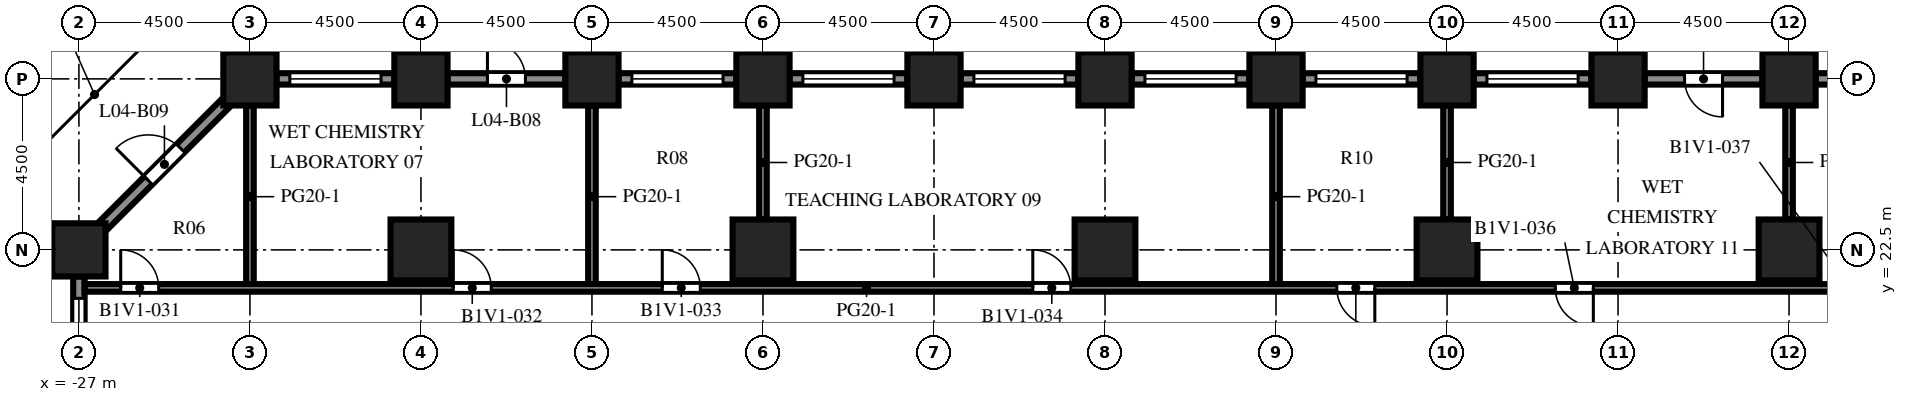
"""IFC4 building model, lengths in metres.
Left out: names, types, materials, properties, quantities, classifications, styles, units other than length and angle.
Written with IfcOpenShell. Run it as: python <this file> out.ifc"""

import sys

from ifc_helpers import new_model, si_unit, direction, frame, frame_2d, origin, origin_2d, place, context, subcontext, project, spatial, rectangle, extrude, element, fill, save


model = new_model("IFC4")
c1 = context("Model", 3, precision=1e-05, world=origin(), true_north=direction((0.0, 1.0)))
c2 = subcontext(c1, "Body", "Model", "MODEL_VIEW")
j1 = project(units=[si_unit("LENGTHUNIT", "METRE"), si_unit("PLANEANGLEUNIT", "RADIAN")], contexts=[c1])
p1 = place(None, origin())
s1 = spatial("IfcSite", under=j1, at=p1, CompositionType="ELEMENT")
p2 = place(p1, origin())
s2 = spatial("IfcBuilding", under=s1, at=p2, CompositionType="ELEMENT")
p3 = place(p2, frame((0.0, 0.0, 19.5)))
s3 = spatial("IfcBuildingStorey", under=s2, at=p3, CompositionType="ELEMENT", Elevation=19.5)
for number, where, z_axis, x_axis in (
    (1, (-27.0, 22.5, 0.0), (0.0, 0.0, 1.0), (1.0, 0.0, 0.0)),
    (2, (-22.5, 27.0, 0.0), (0.0, 0.0, 1.0), (1.0, 0.0, 0.0)),
    (3, (-18.0, 27.0, 0.0), (0.0, 0.0, 1.0), (1.0, 0.0, 0.0)),
    (4, (-13.5, 27.0, 0.0), (0.0, 0.0, 1.0), (1.0, 0.0, 0.0)),
    (5, (-9.0, 27.0, 0.0), (0.0, 0.0, 1.0), (1.0, 0.0, 0.0)),
    (6, (-4.5, 27.0, 0.0), (0.0, 0.0, 1.0), (1.0, 0.0, 0.0)),
    (7, (0.0, 27.0, 0.0), (0.0, 0.0, 1.0), (1.0, 0.0, 0.0)),
    (8, (4.5, 27.0, 0.0), (0.0, 0.0, 1.0), (1.0, 0.0, 0.0)),
    (9, (9.0, 27.0, 0.0), (0.0, 0.0, 1.0), (1.0, 0.0, 0.0)),
    (10, (13.5, 27.0, 0.0), (0.0, 0.0, 1.0), (1.0, 0.0, 0.0)),
    (11, (18.0, 27.0, 0.0), (0.0, 0.0, 1.0), (1.0, 0.0, 0.0)),
):
    element("IfcColumn", number, at=place(p3, frame(where, z_axis=z_axis, x_axis=x_axis)), inside=s3, PredefinedType="COLUMN", context=c2, shape_type="SweptSolid", body=[
        extrude(rectangle(XDim=1.4, YDim=1.4, at=origin_2d()), origin(), (0.0, 0.0, 1.0), 4.1),
    ])
for number, where, z_axis, x_axis in (
    (12, (-18.0, 22.5, 0.0), (0.0, 0.0, 1.0), (1.0, 0.0, 0.0)),
    (13, (-9.0, 22.5, 0.0), (0.0, 0.0, 1.0), (1.0, 0.0, 0.0)),
    (14, (0.0, 22.5, 0.0), (0.0, 0.0, 1.0), (1.0, 0.0, 0.0)),
    (15, (9.0, 22.5, 0.0), (0.0, 0.0, 1.0), (1.0, 0.0, 0.0)),
    (16, (18.0, 22.5, 0.0), (0.0, 0.0, 1.0), (1.0, 0.0, 0.0)),
):
    element("IfcColumn", number, at=place(p3, frame(where, z_axis=z_axis, x_axis=x_axis)), inside=s3, PredefinedType="COLUMN", context=c2, shape_type="SweptSolid", body=[
        extrude(rectangle(XDim=1.6, YDim=1.6, at=origin_2d()), origin(), (0.0, 0.0, 1.0), 4.1),
    ])
p4 = place(p3, frame((18.7, 27.0, 0.0), z_axis=(0.0, 0.0, 1.0), x_axis=(1.0, 0.0, 0.0)))
e17 = element("IfcWall", 17, at=p4, inside=s3, PredefinedType="SOLIDWALL", context=c2, shape_type="SweptSolid", body=[
    extrude(rectangle(XDim=3.1, YDim=0.3, at=frame_2d((1.55, 0.0))), origin(), (0.0, 0.0, 1.0), 2.75),
])
p5 = place(p4, frame((0.35, 0.0, 0.8)))
e18 = element("IfcOpeningElement", 18, at=p5, cuts=e17, PredefinedType="OPENING", context=c2, shape_type="SweptSolid", body=[
    extrude(rectangle(XDim=2.4, YDim=1.7, at=frame_2d((1.2, 0.85))), frame((0.0, 0.16, 0.0), z_axis=(0.0, -1.0, 0.0), x_axis=(1.0, 0.0, 0.0)), (0.0, 0.0, 1.0), 0.32),
])
p6 = place(p3, frame((14.2, 27.0, 0.0), z_axis=(0.0, 0.0, 1.0), x_axis=(1.0, 0.0, 0.0)))
e19 = element("IfcWall", 19, at=p6, inside=s3, PredefinedType="SOLIDWALL", context=c2, shape_type="SweptSolid", body=[
    extrude(rectangle(XDim=3.1, YDim=0.3, at=frame_2d((1.55, 0.0))), origin(), (0.0, 0.0, 1.0), 2.75),
])
p7 = place(p6, frame((1.05, 0.0, 0.0)))
e20 = element("IfcOpeningElement", 20, at=p7, cuts=e19, PredefinedType="OPENING", context=c2, shape_type="SweptSolid", body=[
    extrude(rectangle(XDim=1.0, YDim=2.2, at=frame_2d((0.5, 1.1))), frame((0.0, 0.16, 0.0), z_axis=(0.0, -1.0, 0.0), x_axis=(1.0, 0.0, 0.0)), (0.0, 0.0, 1.0), 0.32),
])
p8 = place(p3, frame((9.7, 27.0, 0.0), z_axis=(0.0, 0.0, 1.0), x_axis=(1.0, 0.0, 0.0)))
e21 = element("IfcWall", 21, at=p8, inside=s3, PredefinedType="SOLIDWALL", context=c2, shape_type="SweptSolid", body=[
    extrude(rectangle(XDim=3.1, YDim=0.3, at=frame_2d((1.55, 0.0))), origin(), (0.0, 0.0, 1.0), 2.75),
])
p9 = place(p8, frame((0.35, 0.0, 0.8)))
e22 = element("IfcOpeningElement", 22, at=p9, cuts=e21, PredefinedType="OPENING", context=c2, shape_type="SweptSolid", body=[
    extrude(rectangle(XDim=2.4, YDim=1.7, at=frame_2d((1.2, 0.85))), frame((0.0, 0.16, 0.0), z_axis=(0.0, -1.0, 0.0), x_axis=(1.0, 0.0, 0.0)), (0.0, 0.0, 1.0), 0.32),
])
p10 = place(p3, frame((5.2, 27.0, 0.0), z_axis=(0.0, 0.0, 1.0), x_axis=(1.0, 0.0, 0.0)))
e23 = element("IfcWall", 23, at=p10, inside=s3, PredefinedType="SOLIDWALL", context=c2, shape_type="SweptSolid", body=[
    extrude(rectangle(XDim=3.1, YDim=0.3, at=frame_2d((1.55, 0.0))), origin(), (0.0, 0.0, 1.0), 2.75),
])
p11 = place(p10, frame((0.35, 0.0, 0.8)))
e24 = element("IfcOpeningElement", 24, at=p11, cuts=e23, PredefinedType="OPENING", context=c2, shape_type="SweptSolid", body=[
    extrude(rectangle(XDim=2.4, YDim=1.7, at=frame_2d((1.2, 0.85))), frame((0.0, 0.16, 0.0), z_axis=(0.0, -1.0, 0.0), x_axis=(1.0, 0.0, 0.0)), (0.0, 0.0, 1.0), 0.32),
])
p12 = place(p3, frame((0.7, 27.0, 0.0), z_axis=(0.0, 0.0, 1.0), x_axis=(1.0, 0.0, 0.0)))
e25 = element("IfcWall", 25, at=p12, inside=s3, PredefinedType="SOLIDWALL", context=c2, shape_type="SweptSolid", body=[
    extrude(rectangle(XDim=3.1, YDim=0.3, at=frame_2d((1.55, 0.0))), origin(), (0.0, 0.0, 1.0), 2.75),
])
p13 = place(p12, frame((0.35, 0.0, 0.8)))
e26 = element("IfcOpeningElement", 26, at=p13, cuts=e25, PredefinedType="OPENING", context=c2, shape_type="SweptSolid", body=[
    extrude(rectangle(XDim=2.4, YDim=1.7, at=frame_2d((1.2, 0.85))), frame((0.0, 0.16, 0.0), z_axis=(0.0, -1.0, 0.0), x_axis=(1.0, 0.0, 0.0)), (0.0, 0.0, 1.0), 0.32),
])
p14 = place(p3, frame((-3.8, 27.0, 0.0), z_axis=(0.0, 0.0, 1.0), x_axis=(1.0, 0.0, 0.0)))
e27 = element("IfcWall", 27, at=p14, inside=s3, PredefinedType="SOLIDWALL", context=c2, shape_type="SweptSolid", body=[
    extrude(rectangle(XDim=3.1, YDim=0.3, at=frame_2d((1.55, 0.0))), origin(), (0.0, 0.0, 1.0), 2.75),
])
p15 = place(p14, frame((0.35, 0.0, 0.8)))
e28 = element("IfcOpeningElement", 28, at=p15, cuts=e27, PredefinedType="OPENING", context=c2, shape_type="SweptSolid", body=[
    extrude(rectangle(XDim=2.4, YDim=1.7, at=frame_2d((1.2, 0.85))), frame((0.0, 0.16, 0.0), z_axis=(0.0, -1.0, 0.0), x_axis=(1.0, 0.0, 0.0)), (0.0, 0.0, 1.0), 0.32),
])
p16 = place(p3, frame((-8.3, 27.0, 0.0), z_axis=(0.0, 0.0, 1.0), x_axis=(1.0, 0.0, 0.0)))
e29 = element("IfcWall", 29, at=p16, inside=s3, PredefinedType="SOLIDWALL", context=c2, shape_type="SweptSolid", body=[
    extrude(rectangle(XDim=3.1, YDim=0.3, at=frame_2d((1.55, 0.0))), origin(), (0.0, 0.0, 1.0), 2.75),
])
p17 = place(p16, frame((0.35, 0.0, 0.8)))
e30 = element("IfcOpeningElement", 30, at=p17, cuts=e29, PredefinedType="OPENING", context=c2, shape_type="SweptSolid", body=[
    extrude(rectangle(XDim=2.4, YDim=1.7, at=frame_2d((1.2, 0.85))), frame((0.0, 0.16, 0.0), z_axis=(0.0, -1.0, 0.0), x_axis=(1.0, 0.0, 0.0)), (0.0, 0.0, 1.0), 0.32),
])
p18 = place(p3, frame((-12.8, 27.0, 0.0), z_axis=(0.0, 0.0, 1.0), x_axis=(1.0, 0.0, 0.0)))
e31 = element("IfcWall", 31, at=p18, inside=s3, PredefinedType="SOLIDWALL", context=c2, shape_type="SweptSolid", body=[
    extrude(rectangle(XDim=3.1, YDim=0.3, at=frame_2d((1.55, 0.0))), origin(), (0.0, 0.0, 1.0), 2.75),
])
p19 = place(p18, frame((0.35, 0.0, 0.8)))
e32 = element("IfcOpeningElement", 32, at=p19, cuts=e31, PredefinedType="OPENING", context=c2, shape_type="SweptSolid", body=[
    extrude(rectangle(XDim=2.4, YDim=1.7, at=frame_2d((1.2, 0.85))), frame((0.0, 0.16, 0.0), z_axis=(0.0, -1.0, 0.0), x_axis=(1.0, 0.0, 0.0)), (0.0, 0.0, 1.0), 0.32),
])
p20 = place(p3, frame((-17.3, 27.0, 0.0), z_axis=(0.0, 0.0, 1.0), x_axis=(1.0, 0.0, 0.0)))
e33 = element("IfcWall", 33, at=p20, inside=s3, PredefinedType="SOLIDWALL", context=c2, shape_type="SweptSolid", body=[
    extrude(rectangle(XDim=3.1, YDim=0.3, at=frame_2d((1.55, 0.0))), origin(), (0.0, 0.0, 1.0), 2.75),
])
p21 = place(p20, frame((1.05, 0.0, 0.0)))
e34 = element("IfcOpeningElement", 34, at=p21, cuts=e33, PredefinedType="OPENING", context=c2, shape_type="SweptSolid", body=[
    extrude(rectangle(XDim=1.0, YDim=2.2, at=frame_2d((0.5, 1.1))), frame((0.0, 0.16, 0.0), z_axis=(0.0, -1.0, 0.0), x_axis=(1.0, 0.0, 0.0)), (0.0, 0.0, 1.0), 0.32),
])
p22 = place(p3, frame((-21.8, 27.0, 0.0), z_axis=(0.0, 0.0, 1.0), x_axis=(1.0, 0.0, 0.0)))
e35 = element("IfcWall", 35, at=p22, inside=s3, PredefinedType="SOLIDWALL", context=c2, shape_type="SweptSolid", body=[
    extrude(rectangle(XDim=3.1, YDim=0.3, at=frame_2d((1.55, 0.0))), origin(), (0.0, 0.0, 1.0), 2.75),
])
p23 = place(p22, frame((0.35, 0.0, 0.8)))
e36 = element("IfcOpeningElement", 36, at=p23, cuts=e35, PredefinedType="OPENING", context=c2, shape_type="SweptSolid", body=[
    extrude(rectangle(XDim=2.4, YDim=1.7, at=frame_2d((1.2, 0.85))), frame((0.0, 0.16, 0.0), z_axis=(0.0, -1.0, 0.0), x_axis=(1.0, 0.0, 0.0)), (0.0, 0.0, 1.0), 0.32),
])
p24 = place(p3, frame((-26.406, 23.094, 0.0), z_axis=(0.0, 0.0, 1.0), x_axis=(0.707106781187, 0.707106781187, 0.0)))
e37 = element("IfcWall", 37, at=p24, inside=s3, PredefinedType="SOLIDWALL", context=c2, shape_type="SweptSolid", body=[
    extrude(rectangle(XDim=4.684, YDim=0.3, at=frame_2d((2.342, 0.0))), origin(), (0.0, 0.0, 1.0), 2.75),
])
p25 = place(p24, frame((1.742, 0.0, 0.0)))
e38 = element("IfcOpeningElement", 38, at=p25, cuts=e37, PredefinedType="OPENING", context=c2, shape_type="SweptSolid", body=[
    extrude(rectangle(XDim=1.2, YDim=2.2, at=frame_2d((0.6, 1.1))), frame((0.0, 0.16, 0.0), z_axis=(0.0, -1.0, 0.0), x_axis=(1.0, 0.0, 0.0)), (0.0, 0.0, 1.0), 0.32),
])
p26 = place(p3, frame((-27.0, 18.7, 0.0), z_axis=(0.0, 0.0, 1.0), x_axis=(0.0, 1.0, 0.0)))
e39 = element("IfcWall", 39, at=p26, inside=s3, PredefinedType="SOLIDWALL", context=c2, shape_type="SweptSolid", body=[
    extrude(rectangle(XDim=3.1, YDim=0.3, at=frame_2d((1.55, 0.0))), origin(), (0.0, 0.0, 1.0), 2.75),
])
p27 = place(p26, frame((0.125, 0.0, 0.8)))
e40 = element("IfcOpeningElement", 40, at=p27, cuts=e39, PredefinedType="OPENING", context=c2, shape_type="SweptSolid", body=[
    extrude(rectangle(XDim=2.4, YDim=1.7, at=frame_2d((1.2, 0.85))), frame((0.0, 0.16, 0.0), z_axis=(0.0, -1.0, 0.0), x_axis=(1.0, 0.0, 0.0)), (0.0, 0.0, 1.0), 0.32),
])
for number, where, z_axis, x_axis in (
    (41, (-22.5, 21.5, 0.0), (0.0, 0.0, 1.0), (0.0, 1.0, 0.0)),
    (42, (-13.5, 21.5, 0.0), (0.0, 0.0, 1.0), (0.0, 1.0, 0.0)),
):
    element("IfcWall", number, at=place(p3, frame(where, z_axis=z_axis, x_axis=x_axis)), inside=s3, PredefinedType="PARTITIONING", context=c2, shape_type="SweptSolid", body=[
        extrude(rectangle(XDim=4.8, YDim=0.2, at=frame_2d((2.4, 0.0))), origin(), (0.0, 0.0, 1.0), 3.65),
    ])
p28 = place(p3, frame((-9.0, 23.3, 0.0), z_axis=(0.0, 0.0, 1.0), x_axis=(0.0, 1.0, 0.0)))
e43 = element("IfcWall", 43, at=p28, inside=s3, PredefinedType="PARTITIONING", context=c2, shape_type="SweptSolid", body=[
    extrude(rectangle(XDim=3.0, YDim=0.2, at=frame_2d((1.5, 0.0))), origin(), (0.0, 0.0, 1.0), 3.65),
])
p29 = place(p3, frame((4.5, 21.5, 0.0), z_axis=(0.0, 0.0, 1.0), x_axis=(0.0, 1.0, 0.0)))
e44 = element("IfcWall", 44, at=p29, inside=s3, PredefinedType="PARTITIONING", context=c2, shape_type="SweptSolid", body=[
    extrude(rectangle(XDim=4.8, YDim=0.2, at=frame_2d((2.4, 0.0))), origin(), (0.0, 0.0, 1.0), 3.65),
])
for number, where, z_axis, x_axis in (
    (45, (9.0, 23.3, 0.0), (0.0, 0.0, 1.0), (0.0, 1.0, 0.0)),
    (46, (18.0, 23.3, 0.0), (0.0, 0.0, 1.0), (0.0, 1.0, 0.0)),
):
    element("IfcWall", number, at=place(p3, frame(where, z_axis=z_axis, x_axis=x_axis)), inside=s3, PredefinedType="PARTITIONING", context=c2, shape_type="SweptSolid", body=[
        extrude(rectangle(XDim=3.0, YDim=0.2, at=frame_2d((1.5, 0.0))), origin(), (0.0, 0.0, 1.0), 3.65),
    ])
p30 = place(p3, frame((-26.85, 21.5, 0.0), z_axis=(0.0, 0.0, 1.0), x_axis=(1.0, 0.0, 0.0)))
e47 = element("IfcWall", 47, at=p30, inside=s3, PredefinedType="PARTITIONING", context=c2, shape_type="SweptSolid", body=[
    extrude(rectangle(XDim=53.7, YDim=0.2, at=frame_2d((26.85, 0.0))), origin(), (0.0, 0.0, 1.0), 3.65),
])
p31 = place(p30, frame((0.95, 0.0, 0.0)))
e48 = element("IfcOpeningElement", 48, at=p31, cuts=e47, PredefinedType="OPENING", context=c2, shape_type="SweptSolid", body=[
    extrude(rectangle(XDim=1.0, YDim=2.1, at=frame_2d((0.5, 1.05))), frame((0.0, 0.11, 0.0), z_axis=(0.0, -1.0, 0.0), x_axis=(1.0, 0.0, 0.0)), (0.0, 0.0, 1.0), 0.22),
])
p32 = place(p30, frame((9.7, 0.0, 0.0)))
e49 = element("IfcOpeningElement", 49, at=p32, cuts=e47, PredefinedType="OPENING", context=c2, shape_type="SweptSolid", body=[
    extrude(rectangle(XDim=1.0, YDim=2.1, at=frame_2d((0.5, 1.05))), frame((0.0, 0.11, 0.0), z_axis=(0.0, -1.0, 0.0), x_axis=(1.0, 0.0, 0.0)), (0.0, 0.0, 1.0), 0.22),
])
p33 = place(p30, frame((15.2, 0.0, 0.0)))
e50 = element("IfcOpeningElement", 50, at=p33, cuts=e47, PredefinedType="OPENING", context=c2, shape_type="SweptSolid", body=[
    extrude(rectangle(XDim=1.0, YDim=2.1, at=frame_2d((0.5, 1.05))), frame((0.0, 0.11, 0.0), z_axis=(0.0, -1.0, 0.0), x_axis=(1.0, 0.0, 0.0)), (0.0, 0.0, 1.0), 0.22),
])
p34 = place(p30, frame((24.95, 0.0, 0.0)))
e51 = element("IfcOpeningElement", 51, at=p34, cuts=e47, PredefinedType="OPENING", context=c2, shape_type="SweptSolid", body=[
    extrude(rectangle(XDim=1.0, YDim=2.1, at=frame_2d((0.5, 1.05))), frame((0.0, 0.11, 0.0), z_axis=(0.0, -1.0, 0.0), x_axis=(1.0, 0.0, 0.0)), (0.0, 0.0, 1.0), 0.22),
])
p35 = place(p30, frame((32.95, 0.0, 0.0)))
e52 = element("IfcOpeningElement", 52, at=p35, cuts=e47, PredefinedType="OPENING", context=c2, shape_type="SweptSolid", body=[
    extrude(rectangle(XDim=1.0, YDim=2.1, at=frame_2d((0.5, 1.05))), frame((0.0, 0.11, 0.0), z_axis=(0.0, -1.0, 0.0), x_axis=(1.0, 0.0, 0.0)), (0.0, 0.0, 1.0), 0.22),
])
p36 = place(p30, frame((38.7, 0.0, 0.0)))
e53 = element("IfcOpeningElement", 53, at=p36, cuts=e47, PredefinedType="OPENING", context=c2, shape_type="SweptSolid", body=[
    extrude(rectangle(XDim=1.0, YDim=2.1, at=frame_2d((0.5, 1.05))), frame((0.0, 0.11, 0.0), z_axis=(0.0, -1.0, 0.0), x_axis=(1.0, 0.0, 0.0)), (0.0, 0.0, 1.0), 0.22),
])
p37 = place(p30, frame((45.95, 0.0, 0.0)))
e54 = element("IfcOpeningElement", 54, at=p37, cuts=e47, PredefinedType="OPENING", context=c2, shape_type="SweptSolid", body=[
    extrude(rectangle(XDim=1.0, YDim=2.1, at=frame_2d((0.5, 1.05))), frame((0.0, 0.11, 0.0), z_axis=(0.0, -1.0, 0.0), x_axis=(1.0, 0.0, 0.0)), (0.0, 0.0, 1.0), 0.22),
])
p38 = place(p30, frame((50.7, 0.0, 0.0)))
e55 = element("IfcOpeningElement", 55, at=p38, cuts=e47, PredefinedType="OPENING", context=c2, shape_type="SweptSolid", body=[
    extrude(rectangle(XDim=1.0, YDim=2.1, at=frame_2d((0.5, 1.05))), frame((0.0, 0.11, 0.0), z_axis=(0.0, -1.0, 0.0), x_axis=(1.0, 0.0, 0.0)), (0.0, 0.0, 1.0), 0.22),
])
p39 = place(p7, origin())
e56 = element("IfcDoor", 56, at=p39, inside=s3, OperationType="SINGLE_SWING_RIGHT", PredefinedType="DOOR", context=c2, shape_type="SweptSolid", body=[
    extrude(rectangle(XDim=1.0, YDim=2.2, at=frame_2d((0.5, 1.1))), frame((0.0, 0.025, 0.0), z_axis=(0.0, -1.0, 0.0), x_axis=(1.0, 0.0, 0.0)), (0.0, 0.0, 1.0), 0.05),
])
fill(e20, e56)
p40 = place(p9, origin())
e57 = element("IfcWindow", 57, at=p40, inside=s3, PartitioningType="SINGLE_PANEL", PredefinedType="WINDOW", context=c2, shape_type="SweptSolid", body=[
    extrude(rectangle(XDim=2.4, YDim=1.7, at=frame_2d((1.2, 0.85))), frame((0.0, 0.03, 0.0), z_axis=(0.0, -1.0, 0.0), x_axis=(1.0, 0.0, 0.0)), (0.0, 0.0, 1.0), 0.06),
])
fill(e22, e57)
p41 = place(p11, origin())
e58 = element("IfcWindow", 58, at=p41, inside=s3, PartitioningType="SINGLE_PANEL", PredefinedType="WINDOW", context=c2, shape_type="SweptSolid", body=[
    extrude(rectangle(XDim=2.4, YDim=1.7, at=frame_2d((1.2, 0.85))), frame((0.0, 0.03, 0.0), z_axis=(0.0, -1.0, 0.0), x_axis=(1.0, 0.0, 0.0)), (0.0, 0.0, 1.0), 0.06),
])
fill(e24, e58)
p42 = place(p13, origin())
e59 = element("IfcWindow", 59, at=p42, inside=s3, PartitioningType="SINGLE_PANEL", PredefinedType="WINDOW", context=c2, shape_type="SweptSolid", body=[
    extrude(rectangle(XDim=2.4, YDim=1.7, at=frame_2d((1.2, 0.85))), frame((0.0, 0.03, 0.0), z_axis=(0.0, -1.0, 0.0), x_axis=(1.0, 0.0, 0.0)), (0.0, 0.0, 1.0), 0.06),
])
fill(e26, e59)
p43 = place(p15, origin())
e60 = element("IfcWindow", 60, at=p43, inside=s3, PartitioningType="SINGLE_PANEL", PredefinedType="WINDOW", context=c2, shape_type="SweptSolid", body=[
    extrude(rectangle(XDim=2.4, YDim=1.7, at=frame_2d((1.2, 0.85))), frame((0.0, 0.03, 0.0), z_axis=(0.0, -1.0, 0.0), x_axis=(1.0, 0.0, 0.0)), (0.0, 0.0, 1.0), 0.06),
])
fill(e28, e60)
p44 = place(p17, origin())
e61 = element("IfcWindow", 61, at=p44, inside=s3, PartitioningType="SINGLE_PANEL", PredefinedType="WINDOW", context=c2, shape_type="SweptSolid", body=[
    extrude(rectangle(XDim=2.4, YDim=1.7, at=frame_2d((1.2, 0.85))), frame((0.0, 0.03, 0.0), z_axis=(0.0, -1.0, 0.0), x_axis=(1.0, 0.0, 0.0)), (0.0, 0.0, 1.0), 0.06),
])
fill(e30, e61)
p45 = place(p19, origin())
e62 = element("IfcWindow", 62, at=p45, inside=s3, PartitioningType="SINGLE_PANEL", PredefinedType="WINDOW", context=c2, shape_type="SweptSolid", body=[
    extrude(rectangle(XDim=2.4, YDim=1.7, at=frame_2d((1.2, 0.85))), frame((0.0, 0.03, 0.0), z_axis=(0.0, -1.0, 0.0), x_axis=(1.0, 0.0, 0.0)), (0.0, 0.0, 1.0), 0.06),
])
fill(e32, e62)
p46 = place(p21, origin())
e63 = element("IfcDoor", 63, at=p46, inside=s3, OperationType="SINGLE_SWING_LEFT", PredefinedType="DOOR", context=c2, shape_type="SweptSolid", body=[
    extrude(rectangle(XDim=1.0, YDim=2.2, at=frame_2d((0.5, 1.1))), frame((0.0, 0.025, 0.0), z_axis=(0.0, -1.0, 0.0), x_axis=(1.0, 0.0, 0.0)), (0.0, 0.0, 1.0), 0.05),
])
fill(e34, e63)
p47 = place(p23, origin())
e64 = element("IfcWindow", 64, at=p47, inside=s3, PartitioningType="SINGLE_PANEL", PredefinedType="WINDOW", context=c2, shape_type="SweptSolid", body=[
    extrude(rectangle(XDim=2.4, YDim=1.7, at=frame_2d((1.2, 0.85))), frame((0.0, 0.03, 0.0), z_axis=(0.0, -1.0, 0.0), x_axis=(1.0, 0.0, 0.0)), (0.0, 0.0, 1.0), 0.06),
])
fill(e36, e64)
p48 = place(p25, origin())
e65 = element("IfcDoor", 65, at=p48, inside=s3, OperationType="SINGLE_SWING_LEFT", PredefinedType="DOOR", context=c2, shape_type="SweptSolid", body=[
    extrude(rectangle(XDim=1.2, YDim=2.2, at=frame_2d((0.6, 1.1))), frame((0.0, 0.025, 0.0), z_axis=(0.0, -1.0, 0.0), x_axis=(1.0, 0.0, 0.0)), (0.0, 0.0, 1.0), 0.05),
])
fill(e38, e65)
p49 = place(p27, origin())
e66 = element("IfcWindow", 66, at=p49, inside=s3, PartitioningType="SINGLE_PANEL", PredefinedType="WINDOW", context=c2, shape_type="SweptSolid", body=[
    extrude(rectangle(XDim=2.4, YDim=1.7, at=frame_2d((1.2, 0.85))), frame((0.0, 0.03, 0.0), z_axis=(0.0, -1.0, 0.0), x_axis=(1.0, 0.0, 0.0)), (0.0, 0.0, 1.0), 0.06),
])
fill(e40, e66)
p50 = place(p31, origin())
e67 = element("IfcDoor", 67, at=p50, inside=s3, OperationType="SINGLE_SWING_LEFT", PredefinedType="DOOR", context=c2, shape_type="SweptSolid", body=[
    extrude(rectangle(XDim=1.0, YDim=2.1, at=frame_2d((0.5, 1.05))), frame((0.0, 0.025, 0.0), z_axis=(0.0, -1.0, 0.0), x_axis=(1.0, 0.0, 0.0)), (0.0, 0.0, 1.0), 0.05),
])
fill(e48, e67)
p51 = place(p32, origin())
e68 = element("IfcDoor", 68, at=p51, inside=s3, OperationType="SINGLE_SWING_LEFT", PredefinedType="DOOR", context=c2, shape_type="SweptSolid", body=[
    extrude(rectangle(XDim=1.0, YDim=2.1, at=frame_2d((0.5, 1.05))), frame((0.0, 0.025, 0.0), z_axis=(0.0, -1.0, 0.0), x_axis=(1.0, 0.0, 0.0)), (0.0, 0.0, 1.0), 0.05),
])
fill(e49, e68)
p52 = place(p33, origin())
e69 = element("IfcDoor", 69, at=p52, inside=s3, OperationType="SINGLE_SWING_LEFT", PredefinedType="DOOR", context=c2, shape_type="SweptSolid", body=[
    extrude(rectangle(XDim=1.0, YDim=2.1, at=frame_2d((0.5, 1.05))), frame((0.0, 0.025, 0.0), z_axis=(0.0, -1.0, 0.0), x_axis=(1.0, 0.0, 0.0)), (0.0, 0.0, 1.0), 0.05),
])
fill(e50, e69)
p53 = place(p34, origin())
e70 = element("IfcDoor", 70, at=p53, inside=s3, OperationType="SINGLE_SWING_LEFT", PredefinedType="DOOR", context=c2, shape_type="SweptSolid", body=[
    extrude(rectangle(XDim=1.0, YDim=2.1, at=frame_2d((0.5, 1.05))), frame((0.0, 0.025, 0.0), z_axis=(0.0, -1.0, 0.0), x_axis=(1.0, 0.0, 0.0)), (0.0, 0.0, 1.0), 0.05),
])
fill(e51, e70)
p54 = place(p35, origin())
e71 = element("IfcDoor", 71, at=p54, inside=s3, OperationType="SINGLE_SWING_RIGHT", PredefinedType="DOOR", context=c2, shape_type="SweptSolid", body=[
    extrude(rectangle(XDim=1.0, YDim=2.1, at=frame_2d((0.5, 1.05))), frame((0.0, 0.025, 0.0), z_axis=(0.0, -1.0, 0.0), x_axis=(1.0, 0.0, 0.0)), (0.0, 0.0, 1.0), 0.05),
])
fill(e52, e71)
p55 = place(p36, origin())
e72 = element("IfcDoor", 72, at=p55, inside=s3, OperationType="SINGLE_SWING_RIGHT", PredefinedType="DOOR", context=c2, shape_type="SweptSolid", body=[
    extrude(rectangle(XDim=1.0, YDim=2.1, at=frame_2d((0.5, 1.05))), frame((0.0, 0.025, 0.0), z_axis=(0.0, -1.0, 0.0), x_axis=(1.0, 0.0, 0.0)), (0.0, 0.0, 1.0), 0.05),
])
fill(e53, e72)
save(model, sys.argv[1])
